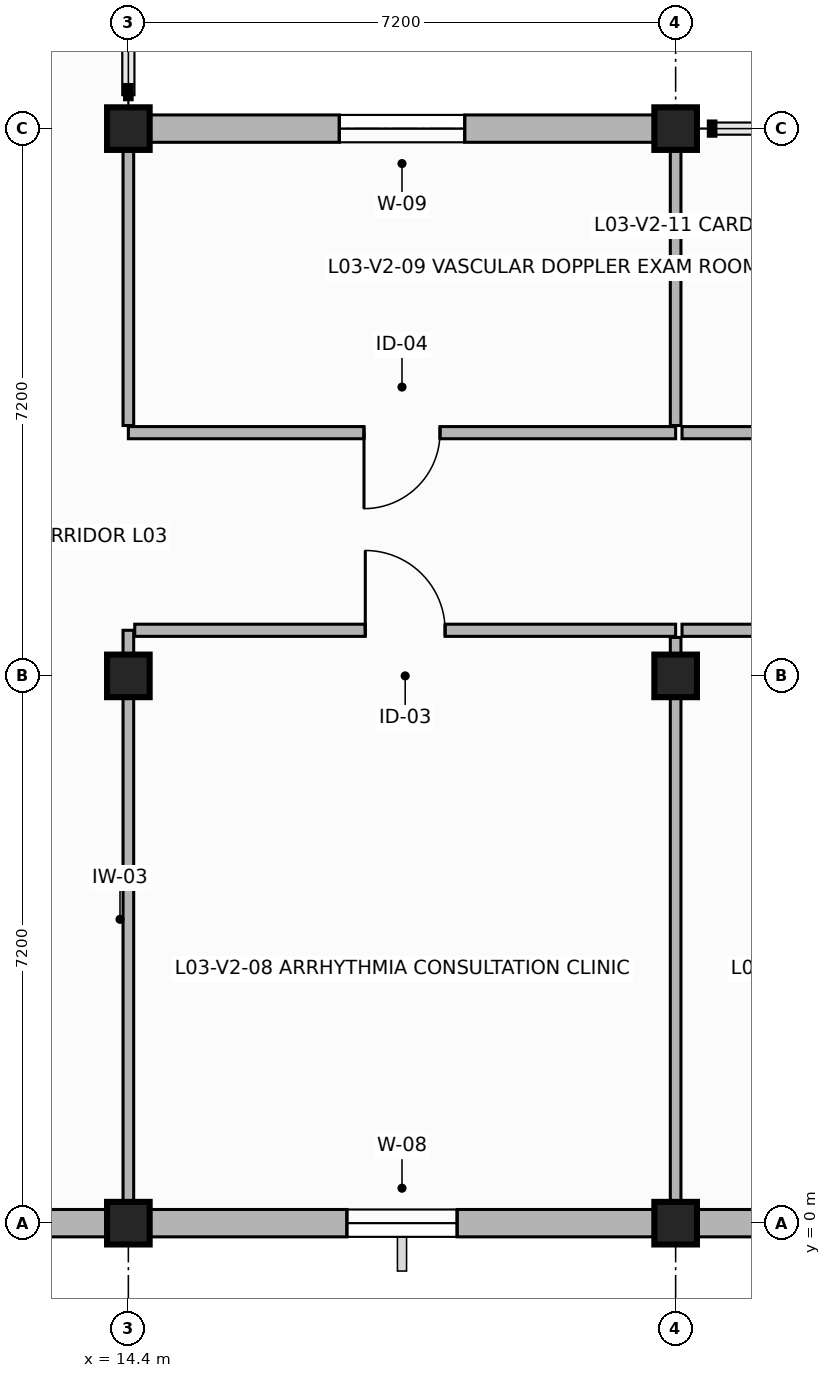
"""IFC4 building model, lengths in metres.
Left out: names, types, materials, properties, quantities, classifications, styles, units other than length and angle.
Written with IfcOpenShell. Run it as: python <this file> out.ifc"""

import sys

from ifc_helpers import new_model, si_unit, direction, frame, frame_2d, origin, origin_2d, place, context, subcontext, project, spatial, rectangle, extrude, element, fill, save


model = new_model("IFC4")
c1 = context("Model", 3, precision=1e-05, world=origin(), true_north=direction((0.0, 1.0)))
c2 = subcontext(c1, "Body", "Model", "MODEL_VIEW")
j1 = project(units=[si_unit("LENGTHUNIT", "METRE"), si_unit("PLANEANGLEUNIT", "RADIAN")], contexts=[c1])
p1 = place(None, origin())
s1 = spatial("IfcSite", under=j1, at=p1, CompositionType="ELEMENT")
p2 = place(p1, origin())
s2 = spatial("IfcBuilding", under=s1, at=p2, CompositionType="ELEMENT")
p3 = place(p2, frame((0.0, 0.0, 12.3)))
s3 = spatial("IfcBuildingStorey", under=s2, at=p3, CompositionType="ELEMENT", Elevation=12.3)
for number, where, z_axis, x_axis in (
    (1, (14.4, 0.0, 0.0), (0.0, 0.0, 1.0), (1.0, 0.0, 0.0)),
    (2, (14.4, 7.2, 0.0), (0.0, 0.0, 1.0), (1.0, 0.0, 0.0)),
    (3, (14.4, 14.4, 0.0), (0.0, 0.0, 1.0), (1.0, 0.0, 0.0)),
    (4, (21.6, 0.0, 0.0), (0.0, 0.0, 1.0), (1.0, 0.0, 0.0)),
    (5, (21.6, 7.2, 0.0), (0.0, 0.0, 1.0), (1.0, 0.0, 0.0)),
    (6, (21.6, 14.4, 0.0), (0.0, 0.0, 1.0), (1.0, 0.0, 0.0)),
):
    element("IfcColumn", number, at=place(p3, frame(where, z_axis=z_axis, x_axis=x_axis)), inside=s3, PredefinedType="COLUMN", context=c2, shape_type="SweptSolid", body=[
        extrude(rectangle(XDim=0.56, YDim=0.56, at=origin_2d()), origin(), (0.0, 0.0, 1.0), 3.42),
    ])
p4 = place(p3, frame((7.2, 0.0, 0.0), z_axis=(0.0, 0.0, 1.0), x_axis=(1.0, 0.0, 0.0)))
e7 = element("IfcWall", 7, at=p4, inside=s3, PredefinedType="SOLIDWALL", context=c2, shape_type="SweptSolid", body=[
    extrude(rectangle(XDim=7.2, YDim=0.36, at=frame_2d((3.6, 0.0))), origin(), (0.0, 0.0, 1.0), 2.8),
])
p5 = place(p4, frame((2.875, 0.0, 0.85)))
e8 = element("IfcOpeningElement", 8, at=p5, cuts=e7, PredefinedType="OPENING", context=c2, shape_type="SweptSolid", body=[
    extrude(rectangle(XDim=1.45, YDim=1.75, at=frame_2d((0.725, 0.875))), frame((0.0, 0.19, 0.0), z_axis=(0.0, -1.0, 0.0), x_axis=(1.0, 0.0, 0.0)), (0.0, 0.0, 1.0), 0.38),
])
p6 = place(p3, frame((14.4, 0.0, 0.0), z_axis=(0.0, 0.0, 1.0), x_axis=(1.0, 0.0, 0.0)))
e9 = element("IfcWall", 9, at=p6, inside=s3, PredefinedType="SOLIDWALL", context=c2, shape_type="SweptSolid", body=[
    extrude(rectangle(XDim=7.2, YDim=0.36, at=frame_2d((3.6, 0.0))), origin(), (0.0, 0.0, 1.0), 2.8),
])
p7 = place(p6, frame((2.875, 0.0, 0.85)))
e10 = element("IfcOpeningElement", 10, at=p7, cuts=e9, PredefinedType="OPENING", context=c2, shape_type="SweptSolid", body=[
    extrude(rectangle(XDim=1.45, YDim=1.75, at=frame_2d((0.725, 0.875))), frame((0.0, 0.19, 0.0), z_axis=(0.0, -1.0, 0.0), x_axis=(1.0, 0.0, 0.0)), (0.0, 0.0, 1.0), 0.38),
])
p8 = place(p3, frame((21.6, 0.0, 0.0), z_axis=(0.0, 0.0, 1.0), x_axis=(1.0, 0.0, 0.0)))
e11 = element("IfcWall", 11, at=p8, inside=s3, PredefinedType="SOLIDWALL", context=c2, shape_type="SweptSolid", body=[
    extrude(rectangle(XDim=7.2, YDim=0.36, at=frame_2d((3.6, 0.0))), origin(), (0.0, 0.0, 1.0), 2.8),
])
p9 = place(p8, frame((2.875, 0.0, 0.85)))
e12 = element("IfcOpeningElement", 12, at=p9, cuts=e11, PredefinedType="OPENING", context=c2, shape_type="SweptSolid", body=[
    extrude(rectangle(XDim=1.45, YDim=1.75, at=frame_2d((0.725, 0.875))), frame((0.0, 0.19, 0.0), z_axis=(0.0, -1.0, 0.0), x_axis=(1.0, 0.0, 0.0)), (0.0, 0.0, 1.0), 0.38),
])
p10 = place(p3, frame((21.6, 14.4, 0.0), z_axis=(0.0, 0.0, 1.0), x_axis=(-1.0, 0.0, 0.0)))
e13 = element("IfcWall", 13, at=p10, inside=s3, PredefinedType="SOLIDWALL", context=c2, shape_type="SweptSolid", body=[
    extrude(rectangle(XDim=7.2, YDim=0.36, at=frame_2d((3.6, 0.0))), origin(), (0.0, 0.0, 1.0), 2.8),
])
p11 = place(p10, frame((2.775, 0.0, 0.85)))
e14 = element("IfcOpeningElement", 14, at=p11, cuts=e13, PredefinedType="OPENING", context=c2, shape_type="SweptSolid", body=[
    extrude(rectangle(XDim=1.65, YDim=1.75, at=frame_2d((0.825, 0.875))), frame((0.0, 0.19, 0.0), z_axis=(0.0, -1.0, 0.0), x_axis=(1.0, 0.0, 0.0)), (0.0, 0.0, 1.0), 0.38),
])
p12 = place(p3, frame((14.4, 0.195, 0.0), z_axis=(0.0, 0.0, 1.0), x_axis=(0.0, 1.0, 0.0)))
e15 = element("IfcWall", 15, at=p12, inside=s3, PredefinedType="PARTITIONING", context=c2, shape_type="SweptSolid", body=[
    extrude(rectangle(XDim=7.605, YDim=0.14, at=frame_2d((3.802, 0.0))), origin(), (0.0, 0.0, 1.0), 2.78),
])
p13 = place(p3, frame((14.484, 7.8, 0.0), z_axis=(0.0, 0.0, 1.0), x_axis=(1.0, 0.0, 0.0)))
e16 = element("IfcWall", 16, at=p13, inside=s3, PredefinedType="PARTITIONING", context=c2, shape_type="SweptSolid", body=[
    extrude(rectangle(XDim=7.116, YDim=0.16, at=frame_2d((3.558, 0.0))), origin(), (0.0, 0.0, 1.0), 2.78),
])
p14 = place(p13, frame((3.033, 0.0, 0.0)))
e17 = element("IfcOpeningElement", 17, at=p14, cuts=e16, PredefinedType="OPENING", context=c2, shape_type="SweptSolid", body=[
    extrude(rectangle(XDim=1.05, YDim=2.15, at=frame_2d((0.525, 1.075))), frame((0.0, 0.09, 0.0), z_axis=(0.0, -1.0, 0.0), x_axis=(1.0, 0.0, 0.0)), (0.0, 0.0, 1.0), 0.18),
])
p15 = place(p3, frame((21.6, 7.706, 0.0), z_axis=(0.0, 0.0, 1.0), x_axis=(0.0, -1.0, 0.0)))
e18 = element("IfcWall", 18, at=p15, inside=s3, PredefinedType="PARTITIONING", context=c2, shape_type="SweptSolid", body=[
    extrude(rectangle(XDim=7.511, YDim=0.14, at=frame_2d((3.755, 0.0))), origin(), (0.0, 0.0, 1.0), 2.78),
])
p16 = place(p3, frame((21.6, 10.4, 0.0), z_axis=(0.0, 0.0, 1.0), x_axis=(-1.0, 0.0, 0.0)))
e19 = element("IfcWall", 19, at=p16, inside=s3, PredefinedType="PARTITIONING", context=c2, shape_type="SweptSolid", body=[
    extrude(rectangle(XDim=7.2, YDim=0.16, at=frame_2d((3.6, 0.0))), origin(), (0.0, 0.0, 1.0), 2.78),
])
p17 = place(p16, frame((3.1, 0.0, 0.0)))
e20 = element("IfcOpeningElement", 20, at=p17, cuts=e19, PredefinedType="OPENING", context=c2, shape_type="SweptSolid", body=[
    extrude(rectangle(XDim=1.0, YDim=2.15, at=frame_2d((0.5, 1.075))), frame((0.0, 0.09, 0.0), z_axis=(0.0, -1.0, 0.0), x_axis=(1.0, 0.0, 0.0)), (0.0, 0.0, 1.0), 0.18),
])
for number, where, z_axis, x_axis in (
    (21, (14.4, 10.494, 0.0), (0.0, 0.0, 1.0), (0.0, 1.0, 0.0)),
    (22, (21.6, 14.205, 0.0), (0.0, 0.0, 1.0), (0.0, -1.0, 0.0)),
):
    element("IfcWall", number, at=place(p3, frame(where, z_axis=z_axis, x_axis=x_axis)), inside=s3, PredefinedType="PARTITIONING", context=c2, shape_type="SweptSolid", body=[
        extrude(rectangle(XDim=3.711, YDim=0.14, at=frame_2d((1.855, 0.0))), origin(), (0.0, 0.0, 1.0), 2.78),
    ])
p18 = place(p3, frame((21.684, 7.8, 0.0), z_axis=(0.0, 0.0, 1.0), x_axis=(1.0, 0.0, 0.0)))
e23 = element("IfcWall", 23, at=p18, inside=s3, PredefinedType="PARTITIONING", context=c2, shape_type="SweptSolid", body=[
    extrude(rectangle(XDim=7.116, YDim=0.16, at=frame_2d((3.558, 0.0))), origin(), (0.0, 0.0, 1.0), 2.78),
])
p19 = place(p18, frame((3.033, 0.0, 0.0)))
e24 = element("IfcOpeningElement", 24, at=p19, cuts=e23, PredefinedType="OPENING", context=c2, shape_type="SweptSolid", body=[
    extrude(rectangle(XDim=1.05, YDim=2.15, at=frame_2d((0.525, 1.075))), frame((0.0, 0.09, 0.0), z_axis=(0.0, -1.0, 0.0), x_axis=(1.0, 0.0, 0.0)), (0.0, 0.0, 1.0), 0.18),
])
p20 = place(p3, frame((28.8, 10.4, 0.0), z_axis=(0.0, 0.0, 1.0), x_axis=(-1.0, 0.0, 0.0)))
e25 = element("IfcWall", 25, at=p20, inside=s3, PredefinedType="PARTITIONING", context=c2, shape_type="SweptSolid", body=[
    extrude(rectangle(XDim=7.116, YDim=0.16, at=frame_2d((3.558, 0.0))), origin(), (0.0, 0.0, 1.0), 2.78),
])
p21 = place(p20, frame((3.033, 0.0, 0.0)))
e26 = element("IfcOpeningElement", 26, at=p21, cuts=e25, PredefinedType="OPENING", context=c2, shape_type="SweptSolid", body=[
    extrude(rectangle(XDim=1.05, YDim=2.15, at=frame_2d((0.525, 1.075))), frame((0.0, 0.09, 0.0), z_axis=(0.0, -1.0, 0.0), x_axis=(1.0, 0.0, 0.0)), (0.0, 0.0, 1.0), 0.18),
])
p22 = place(p7, origin())
e27 = element("IfcWindow", 27, at=p22, inside=s3, PartitioningType="SINGLE_PANEL", PredefinedType="WINDOW", context=c2, shape_type="SweptSolid", body=[
    extrude(rectangle(XDim=1.45, YDim=1.75, at=frame_2d((0.725, 0.875))), frame((0.0, 0.03, 0.0), z_axis=(0.0, -1.0, 0.0), x_axis=(1.0, 0.0, 0.0)), (0.0, 0.0, 1.0), 0.06),
])
fill(e10, e27)
p23 = place(p11, origin())
e28 = element("IfcWindow", 28, at=p23, inside=s3, PartitioningType="SINGLE_PANEL", PredefinedType="WINDOW", context=c2, shape_type="SweptSolid", body=[
    extrude(rectangle(XDim=1.65, YDim=1.75, at=frame_2d((0.825, 0.875))), frame((0.0, 0.03, 0.0), z_axis=(0.0, -1.0, 0.0), x_axis=(1.0, 0.0, 0.0)), (0.0, 0.0, 1.0), 0.06),
])
fill(e14, e28)
p24 = place(p14, origin())
e29 = element("IfcDoor", 29, at=p24, inside=s3, OperationType="SINGLE_SWING_LEFT", PredefinedType="DOOR", context=c2, shape_type="SweptSolid", body=[
    extrude(rectangle(XDim=1.05, YDim=2.15, at=frame_2d((0.525, 1.075))), frame((0.0, 0.025, 0.0), z_axis=(0.0, -1.0, 0.0), x_axis=(1.0, 0.0, 0.0)), (0.0, 0.0, 1.0), 0.05),
])
fill(e17, e29)
p25 = place(p17, origin())
e30 = element("IfcDoor", 30, at=p25, inside=s3, OperationType="SINGLE_SWING_RIGHT", PredefinedType="DOOR", context=c2, shape_type="SweptSolid", body=[
    extrude(rectangle(XDim=1.0, YDim=2.15, at=frame_2d((0.5, 1.075))), frame((0.0, 0.025, 0.0), z_axis=(0.0, -1.0, 0.0), x_axis=(1.0, 0.0, 0.0)), (0.0, 0.0, 1.0), 0.05),
])
fill(e20, e30)
save(model, sys.argv[1])
